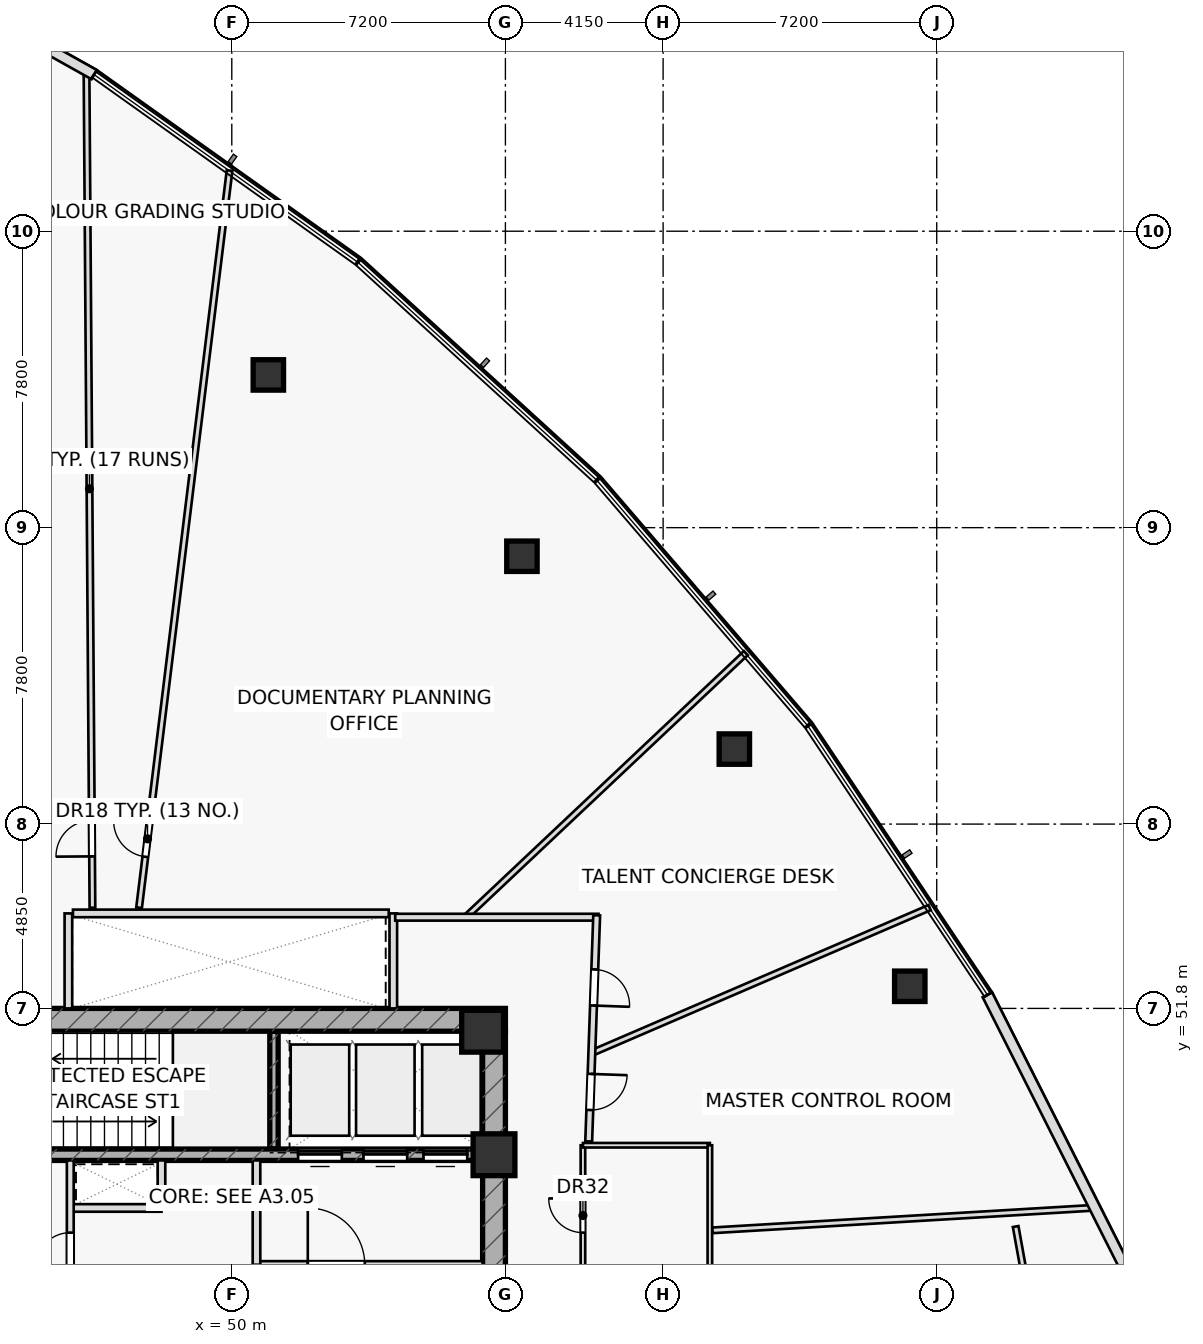
"""IFC4 building model, lengths in metres.
Left out: names, types, materials, properties, quantities, classifications, styles, units other than length and angle.
Written with IfcOpenShell. Run it as: python <this file> out.ifc"""

import sys

from ifc_helpers import new_model, si_unit, direction, frame, frame_2d, origin, origin_2d, place, context, subcontext, project, spatial, rectangle, hollow_rectangle, extrude, element, fill, save


model = new_model("IFC4")
c1 = context("Model", 3, precision=1e-05, world=origin(), true_north=direction((0.0, 1.0)))
c2 = subcontext(c1, "Body", "Model", "MODEL_VIEW")
j1 = project(units=[si_unit("LENGTHUNIT", "METRE"), si_unit("PLANEANGLEUNIT", "RADIAN")], contexts=[c1])
p1 = place(None, origin())
s1 = spatial("IfcSite", under=j1, at=p1, CompositionType="ELEMENT")
p2 = place(p1, origin())
s2 = spatial("IfcBuilding", under=s1, at=p2, CompositionType="ELEMENT")
p3 = place(p2, frame((0.0, 0.0, 54.9)))
s3 = spatial("IfcBuildingStorey", under=s2, at=p3, CompositionType="ELEMENT", Elevation=54.9)
p4 = place(p3, frame((51.11, 48.1, 0.0), z_axis=(0.0, 0.0, 1.0), x_axis=(0.0, 1.0, 0.0)))
e1 = element("IfcWall", 1, at=p4, inside=s3, PredefinedType="SHEAR", context=c2, shape_type="SweptSolid", body=[
    extrude(rectangle(XDim=3.1, YDim=0.22, at=frame_2d((1.55, 0.0))), origin(), (0.0, 0.0, 1.0), 3.6),
])
p5 = place(p3, frame((42.8, 51.5, 0.0), z_axis=(0.0, 0.0, 1.0), x_axis=(1.0, 0.0, 0.0)))
e2 = element("IfcWall", 2, at=p5, inside=s3, PredefinedType="SHEAR", context=c2, shape_type="SweptSolid", body=[
    extrude(rectangle(XDim=14.4, YDim=0.6, at=frame_2d((7.2, 0.0))), origin(), (0.0, 0.0, 1.0), 3.6),
])
p6 = place(p5, frame((0.88, 0.0, 0.0)))
e3 = element("IfcOpeningElement", 3, at=p6, cuts=e2, PredefinedType="OPENING", context=c2, shape_type="SweptSolid", body=[
    extrude(rectangle(XDim=1.05, YDim=2.2, at=frame_2d((0.525, 1.1))), frame((0.0, 0.31, 0.0), z_axis=(0.0, -1.0, 0.0), x_axis=(1.0, 0.0, 0.0)), (0.0, 0.0, 1.0), 0.62),
])
p7 = place(p3, frame((56.9, 38.8, 0.0), z_axis=(0.0, 0.0, 1.0), x_axis=(0.0, 1.0, 0.0)))
e4 = element("IfcWall", 4, at=p7, inside=s3, PredefinedType="SHEAR", context=c2, shape_type="SweptSolid", body=[
    extrude(rectangle(XDim=12.4, YDim=0.6, at=frame_2d((6.2, 0.0))), origin(), (0.0, 0.0, 1.0), 3.6),
])
p8 = place(p7, frame((3.85, 0.0, 0.0)))
e5 = element("IfcOpeningElement", 5, at=p8, cuts=e4, PredefinedType="OPENING", context=c2, shape_type="SweptSolid", body=[
    extrude(rectangle(XDim=1.5, YDim=2.2, at=frame_2d((0.75, 1.1))), frame((0.0, 0.31, 0.0), z_axis=(0.0, -1.0, 0.0), x_axis=(1.0, 0.0, 0.0)), (0.0, 0.0, 1.0), 0.62),
])
p9 = place(p3, frame((43.4, 47.95, 0.0), z_axis=(0.0, 0.0, 1.0), x_axis=(1.0, 0.0, 0.0)))
e6 = element("IfcWall", 6, at=p9, inside=s3, PredefinedType="SHEAR", context=c2, shape_type="SweptSolid", body=[
    extrude(rectangle(XDim=13.2, YDim=0.3, at=frame_2d((6.6, 0.0))), origin(), (0.0, 0.0, 1.0), 3.6),
])
p10 = place(p9, frame((8.345, 0.0, 0.0)))
e7 = element("IfcOpeningElement", 7, at=p10, cuts=e6, PredefinedType="OPENING", context=c2, shape_type="SweptSolid", body=[
    extrude(rectangle(XDim=1.15, YDim=2.2, at=frame_2d((0.575, 1.1))), frame((0.0, 0.16, 0.0), z_axis=(0.0, -1.0, 0.0), x_axis=(1.0, 0.0, 0.0)), (0.0, 0.0, 1.0), 0.32),
])
p11 = place(p9, frame((10.065, 0.0, 0.0)))
e8 = element("IfcOpeningElement", 8, at=p11, cuts=e6, PredefinedType="OPENING", context=c2, shape_type="SweptSolid", body=[
    extrude(rectangle(XDim=1.15, YDim=2.2, at=frame_2d((0.575, 1.1))), frame((0.0, 0.16, 0.0), z_axis=(0.0, -1.0, 0.0), x_axis=(1.0, 0.0, 0.0)), (0.0, 0.0, 1.0), 0.32),
])
p12 = place(p9, frame((11.645, 0.0, 0.0)))
e9 = element("IfcOpeningElement", 9, at=p12, cuts=e6, PredefinedType="OPENING", context=c2, shape_type="SweptSolid", body=[
    extrude(rectangle(XDim=1.15, YDim=2.2, at=frame_2d((0.575, 1.1))), frame((0.0, 0.16, 0.0), z_axis=(0.0, -1.0, 0.0), x_axis=(1.0, 0.0, 0.0)), (0.0, 0.0, 1.0), 0.32),
])
for number, where, z_axis, x_axis in (
    (10, (56.9, 47.95, 0.0), (0.0, 0.0, 1.0), (1.0, 0.0, 0.0)),
    (11, (56.6, 51.2, 0.0), (0.0, 0.0, 1.0), (1.0, 0.0, 0.0)),
):
    element("IfcColumn", number, at=place(p3, frame(where, z_axis=z_axis, x_axis=x_axis)), inside=s3, PredefinedType="COLUMN", context=c2, shape_type="SweptSolid", body=[
        extrude(rectangle(XDim=1.1, YDim=1.1, at=origin_2d()), origin(), (0.0, 0.0, 1.0), 3.6),
    ])
for number, where, z_axis, x_axis in (
    (12, (67.841, 52.383, 0.0), (0.0, 0.0, 1.0), (1.0, 0.0, 0.0)),
    (13, (63.224, 58.624, 0.0), (0.0, 0.0, 1.0), (1.0, 0.0, 0.0)),
    (14, (57.635, 63.698, 0.0), (0.0, 0.0, 1.0), (1.0, 0.0, 0.0)),
    (15, (50.962, 68.469, 0.0), (0.0, 0.0, 1.0), (1.0, 0.0, 0.0)),
):
    element("IfcColumn", number, at=place(p3, frame(where, z_axis=z_axis, x_axis=x_axis)), inside=s3, PredefinedType="COLUMN", context=c2, shape_type="SweptSolid", body=[
        extrude(hollow_rectangle(XDim=0.8, YDim=0.8, WallThickness=0.045, at=origin_2d()), origin(), (0.0, 0.0, 1.0), 3.6),
    ])
for number, where, z_axis, x_axis in (
    (16, (45.7, 51.8, 0.0), (0.0, 0.0, 1.0), (0.0, 1.0, 0.0)),
    (17, (54.25, 51.8, 0.0), (0.0, 0.0, 1.0), (0.0, 1.0, 0.0)),
):
    element("IfcWall", number, at=place(p3, frame(where, z_axis=z_axis, x_axis=x_axis)), inside=s3, PredefinedType="PARTITIONING", context=c2, shape_type="SweptSolid", body=[
        extrude(rectangle(XDim=2.5, YDim=0.2, at=frame_2d((1.25, 0.0))), origin(), (0.0, 0.0, 1.0), 3.6),
    ])
p13 = place(p3, frame((45.75, 46.55, 0.0), z_axis=(0.0, 0.0, 1.0), x_axis=(1.0, 0.0, 0.0)))
e18 = element("IfcWall", 18, at=p13, inside=s3, PredefinedType="PARTITIONING", context=c2, shape_type="SweptSolid", body=[
    extrude(rectangle(XDim=2.4, YDim=0.2, at=frame_2d((1.2, 0.0))), origin(), (0.0, 0.0, 1.0), 3.6),
])
p14 = place(p3, frame((48.15, 46.55, 0.0), z_axis=(0.0, 0.0, 1.0), x_axis=(0.0, 1.0, 0.0)))
e19 = element("IfcWall", 19, at=p14, inside=s3, PredefinedType="PARTITIONING", context=c2, shape_type="SweptSolid", body=[
    extrude(rectangle(XDim=1.25, YDim=0.2, at=frame_2d((0.625, 0.0))), origin(), (0.0, 0.0, 1.0), 3.6),
])
p15 = place(p3, frame((50.65, 45.05, 0.0), z_axis=(0.0, 0.0, 1.0), x_axis=(1.0, 0.0, 0.0)))
e20 = element("IfcWall", 20, at=p15, inside=s3, PredefinedType="PARTITIONING", context=c2, shape_type="SweptSolid", body=[
    extrude(rectangle(XDim=5.95, YDim=0.2, at=frame_2d((2.975, 0.0))), origin(), (0.0, 0.0, 1.0), 3.6),
])
p16 = place(p15, frame((1.35, 0.0, 0.0)))
e21 = element("IfcOpeningElement", 21, at=p16, cuts=e20, PredefinedType="OPENING", context=c2, shape_type="SweptSolid", body=[
    extrude(rectangle(XDim=1.5, YDim=2.2, at=frame_2d((0.75, 1.1))), frame((0.0, 0.11, 0.0), z_axis=(0.0, -1.0, 0.0), x_axis=(1.0, 0.0, 0.0)), (0.0, 0.0, 1.0), 0.22),
])
p17 = place(p3, frame((50.65, 45.05, 0.0), z_axis=(0.0, 0.0, 1.0), x_axis=(0.0, 1.0, 0.0)))
e22 = element("IfcWall", 22, at=p17, inside=s3, PredefinedType="PARTITIONING", context=c2, shape_type="SweptSolid", body=[
    extrude(rectangle(XDim=2.75, YDim=0.2, at=frame_2d((1.375, 0.0))), origin(), (0.0, 0.0, 1.0), 3.6),
])
p18 = place(p3, frame((45.75, 42.2, 0.0), z_axis=(0.0, 0.0, 1.0), x_axis=(0.0, 1.0, 0.0)))
e23 = element("IfcWall", 23, at=p18, inside=s3, PredefinedType="PARTITIONING", context=c2, shape_type="SweptSolid", body=[
    extrude(rectangle(XDim=5.6, YDim=0.18, at=frame_2d((2.8, 0.0))), origin(), (0.0, 0.0, 1.0), 3.6),
])
p19 = place(p18, frame((0.42, 0.0, 0.0)))
e24 = element("IfcOpeningElement", 24, at=p19, cuts=e23, PredefinedType="OPENING", context=c2, shape_type="SweptSolid", body=[
    extrude(rectangle(XDim=0.85, YDim=2.05, at=frame_2d((0.425, 1.025))), frame((0.0, 0.1, 0.0), z_axis=(0.0, -1.0, 0.0), x_axis=(1.0, 0.0, 0.0)), (0.0, 0.0, 1.0), 0.2),
])
p20 = place(p18, frame((1.57, 0.0, 0.0)))
e25 = element("IfcOpeningElement", 25, at=p20, cuts=e23, PredefinedType="OPENING", context=c2, shape_type="SweptSolid", body=[
    extrude(rectangle(XDim=0.85, YDim=2.05, at=frame_2d((0.425, 1.025))), frame((0.0, 0.1, 0.0), z_axis=(0.0, -1.0, 0.0), x_axis=(1.0, 0.0, 0.0)), (0.0, 0.0, 1.0), 0.2),
])
p21 = place(p18, frame((2.8, 0.0, 0.0)))
e26 = element("IfcOpeningElement", 26, at=p21, cuts=e23, PredefinedType="OPENING", context=c2, shape_type="SweptSolid", body=[
    extrude(rectangle(XDim=0.9, YDim=2.05, at=frame_2d((0.45, 1.025))), frame((0.0, 0.1, 0.0), z_axis=(0.0, -1.0, 0.0), x_axis=(1.0, 0.0, 0.0)), (0.0, 0.0, 1.0), 0.2),
])
p22 = place(p3, frame((72.969, 33.091, 0.0), z_axis=(0.0, 0.0, 1.0), x_axis=(-0.177742578179, 0.984077017261, 0.0)))
e27 = element("IfcWall", 27, at=p22, inside=s3, PredefinedType="PARTITIONING", context=c2, shape_type="SweptSolid", body=[
    extrude(rectangle(XDim=13.179, YDim=0.15, at=frame_2d((6.59, 0.0))), origin(), (0.0, 0.0, 1.0), 2.925),
])
p23 = place(p3, frame((59.24, 41.2, 0.0), z_axis=(0.0, 0.0, 1.0), x_axis=(0.0, 1.0, 0.0)))
e28 = element("IfcWall", 28, at=p23, inside=s3, PredefinedType="PARTITIONING", context=c2, shape_type="SweptSolid", body=[
    extrude(rectangle(XDim=7.0, YDim=0.12, at=frame_2d((3.5, 0.0))), origin(), (0.0, 0.0, 1.0), 3.6),
])
p24 = place(p23, frame((1.15, 0.0, 0.0)))
e29 = element("IfcOpeningElement", 29, at=p24, cuts=e28, PredefinedType="OPENING", context=c2, shape_type="SweptSolid", body=[
    extrude(rectangle(XDim=0.9, YDim=2.05, at=frame_2d((0.45, 1.025))), frame((0.0, 0.07, 0.0), z_axis=(0.0, -1.0, 0.0), x_axis=(1.0, 0.0, 0.0)), (0.0, 0.0, 1.0), 0.14),
])
p25 = place(p23, frame((4.7, 0.0, 0.0)))
e30 = element("IfcOpeningElement", 30, at=p25, cuts=e28, PredefinedType="OPENING", context=c2, shape_type="SweptSolid", body=[
    extrude(rectangle(XDim=0.9, YDim=2.05, at=frame_2d((0.45, 1.025))), frame((0.0, 0.07, 0.0), z_axis=(0.0, -1.0, 0.0), x_axis=(1.0, 0.0, 0.0)), (0.0, 0.0, 1.0), 0.14),
])
p26 = place(p3, frame((59.24, 48.2, 0.0), z_axis=(0.0, 0.0, 1.0), x_axis=(1.0, 0.0, 0.0)))
e31 = element("IfcWall", 31, at=p26, inside=s3, PredefinedType="PARTITIONING", context=c2, shape_type="SweptSolid", body=[
    extrude(rectangle(XDim=3.34, YDim=0.12, at=frame_2d((1.67, 0.0))), origin(), (0.0, 0.0, 1.0), 3.6),
])
p27 = place(p3, frame((62.58, 41.2, 0.0), z_axis=(0.0, 0.0, 1.0), x_axis=(0.0, 1.0, 0.0)))
e32 = element("IfcWall", 32, at=p27, inside=s3, PredefinedType="PARTITIONING", context=c2, shape_type="SweptSolid", body=[
    extrude(rectangle(XDim=7.0, YDim=0.12, at=frame_2d((3.5, 0.0))), origin(), (0.0, 0.0, 1.0), 3.6),
])
p28 = place(p3, frame((47.56, 54.45, 0.0), z_axis=(0.0, 0.0, 1.0), x_axis=(0.121866471356, 0.99254650428, 0.0)))
e33 = element("IfcWall", 33, at=p28, inside=s3, PredefinedType="PARTITIONING", context=c2, shape_type="SweptSolid", body=[
    extrude(rectangle(XDim=19.543, YDim=0.15, at=frame_2d((9.771, 0.0))), origin(), (0.0, 0.0, 1.0), 2.975),
])
p29 = place(p28, frame((1.35, 0.0, 0.0)))
e34 = element("IfcOpeningElement", 34, at=p29, cuts=e33, PredefinedType="OPENING", context=c2, shape_type="SweptSolid", body=[
    extrude(rectangle(XDim=0.95, YDim=2.05, at=frame_2d((0.475, 1.025))), frame((0.0, 0.085, 0.0), z_axis=(0.0, -1.0, 0.0), x_axis=(1.0, 0.0, 0.0)), (0.0, 0.0, 1.0), 0.17),
])
p30 = place(p3, frame((46.333, 54.45, 0.0), z_axis=(0.0, 0.0, 1.0), x_axis=(-0.007065709124, 0.999975037566, 0.0)))
e35 = element("IfcWall", 35, at=p30, inside=s3, PredefinedType="PARTITIONING", context=c2, shape_type="SweptSolid", body=[
    extrude(rectangle(XDim=22.045, YDim=0.15, at=frame_2d((11.022, 0.0))), origin(), (0.0, 0.0, 1.0), 2.975),
])
p31 = place(p30, frame((1.35, 0.0, 0.0)))
e36 = element("IfcOpeningElement", 36, at=p31, cuts=e35, PredefinedType="OPENING", context=c2, shape_type="SweptSolid", body=[
    extrude(rectangle(XDim=0.95, YDim=2.05, at=frame_2d((0.475, 1.025))), frame((0.0, 0.085, 0.0), z_axis=(0.0, -1.0, 0.0), x_axis=(1.0, 0.0, 0.0)), (0.0, 0.0, 1.0), 0.17),
])
p32 = place(p3, frame((62.65, 45.961, 0.0), z_axis=(0.0, 0.0, 1.0), x_axis=(0.998256468531, 0.059025613391, 0.0)))
e37 = element("IfcWall", 37, at=p32, inside=s3, PredefinedType="PARTITIONING", context=c2, shape_type="SweptSolid", body=[
    extrude(rectangle(XDim=10.088, YDim=0.15, at=frame_2d((5.044, 0.0))), origin(), (0.0, 0.0, 1.0), 2.975),
])
p33 = place(p3, frame((59.474, 50.627, 0.0), z_axis=(0.0, 0.0, 1.0), x_axis=(0.918535829974, 0.395337740488, 0.0)))
e38 = element("IfcWall", 38, at=p33, inside=s3, PredefinedType="PARTITIONING", context=c2, shape_type="SweptSolid", body=[
    extrude(rectangle(XDim=9.677, YDim=0.15, at=frame_2d((4.838, 0.0))), origin(), (0.0, 0.0, 1.0), 2.925),
])
p34 = place(p3, frame((56.156, 54.2, 0.0), z_axis=(0.0, 0.0, 1.0), x_axis=(0.72755365907, 0.686050780317, 0.0)))
e39 = element("IfcWall", 39, at=p34, inside=s3, PredefinedType="PARTITIONING", context=c2, shape_type="SweptSolid", body=[
    extrude(rectangle(XDim=10.13, YDim=0.15, at=frame_2d((5.065, 0.0))), origin(), (0.0, 0.0, 1.0), 2.925),
])
p35 = place(p3, frame((54.3, 54.2, 0.0), z_axis=(0.0, 0.0, 1.0), x_axis=(1.0, 0.0, 0.0)))
e40 = element("IfcWall", 40, at=p35, inside=s3, PredefinedType="PARTITIONING", context=c2, shape_type="SweptSolid", body=[
    extrude(rectangle(XDim=5.35, YDim=0.18, at=frame_2d((2.675, 0.0))), origin(), (0.0, 0.0, 1.0), 2.925),
])
p36 = place(p3, frame((59.602, 54.25, 0.0), z_axis=(0.0, 0.0, 1.0), x_axis=(-0.035265891834, -0.999377964973, 0.0)))
e41 = element("IfcWall", 41, at=p36, inside=s3, PredefinedType="PARTITIONING", context=c2, shape_type="SweptSolid", body=[
    extrude(rectangle(XDim=5.954, YDim=0.18, at=frame_2d((2.977, 0.0))), origin(), (0.0, 0.0, 1.0), 2.925),
])
p37 = place(p36, frame((1.426, 0.0, 0.0)))
e42 = element("IfcOpeningElement", 42, at=p37, cuts=e41, PredefinedType="OPENING", context=c2, shape_type="SweptSolid", body=[
    extrude(rectangle(XDim=0.95, YDim=2.05, at=frame_2d((0.475, 1.025))), frame((0.0, 0.1, 0.0), z_axis=(0.0, -1.0, 0.0), x_axis=(1.0, 0.0, 0.0)), (0.0, 0.0, 1.0), 0.2),
])
p38 = place(p36, frame((4.176, 0.0, 0.0)))
e43 = element("IfcOpeningElement", 43, at=p38, cuts=e41, PredefinedType="OPENING", context=c2, shape_type="SweptSolid", body=[
    extrude(rectangle(XDim=0.95, YDim=2.05, at=frame_2d((0.475, 1.025))), frame((0.0, 0.1, 0.0), z_axis=(0.0, -1.0, 0.0), x_axis=(1.0, 0.0, 0.0)), (0.0, 0.0, 1.0), 0.2),
])
p39 = place(p3, frame((46.377, 76.371, 0.0), z_axis=(0.0, 0.0, 1.0), x_axis=(-0.872541591188, 0.488539836295, 0.0)))
e44 = element("IfcWall", 44, at=p39, inside=s3, PredefinedType="STANDARD", context=c2, shape_type="SweptSolid", body=[
    extrude(rectangle(XDim=2.223, YDim=0.28, at=frame_2d((1.112, 0.0))), origin(), (0.0, 0.0, 1.0), 3.6),
])
p40 = place(p3, frame((73.728, 44.537, 0.0), z_axis=(0.0, 0.0, 1.0), x_axis=(-0.450471385419, 0.892790866283, 0.0)))
e45 = element("IfcWall", 45, at=p40, inside=s3, PredefinedType="STANDARD", context=c2, shape_type="SweptSolid", body=[
    extrude(rectangle(XDim=8.535, YDim=0.28, at=frame_2d((4.268, 0.0))), origin(), (0.0, 0.0, 1.0), 3.6),
])
p41 = place(p3, frame((45.82, 54.3, 0.0), z_axis=(0.0, 0.0, 1.0), x_axis=(1.0, 0.0, 0.0)))
e46 = element("IfcWall", 46, at=p41, inside=s3, PredefinedType="PARTITIONING", context=c2, shape_type="SweptSolid", body=[
    extrude(rectangle(XDim=8.31, YDim=0.2, at=frame_2d((4.155, 0.0))), origin(), (0.0, 0.0, 1.0), 3.6),
])
p42 = place(p16, origin())
e47 = element("IfcDoor", 47, at=p42, inside=s3, OperationType="SINGLE_SWING_LEFT", PredefinedType="DOOR", context=c2, shape_type="SweptSolid", body=[
    extrude(rectangle(XDim=1.5, YDim=2.2, at=frame_2d((0.75, 1.1))), frame((0.0, 0.025, 0.0), z_axis=(0.0, -1.0, 0.0), x_axis=(1.0, 0.0, 0.0)), (0.0, 0.0, 1.0), 0.05),
])
fill(e21, e47)
p43 = place(p21, origin())
e48 = element("IfcDoor", 48, at=p43, inside=s3, OperationType="SINGLE_SWING_LEFT", PredefinedType="DOOR", context=c2, shape_type="SweptSolid", body=[
    extrude(rectangle(XDim=0.9, YDim=2.05, at=frame_2d((0.45, 1.025))), frame((0.0, 0.025, 0.0), z_axis=(0.0, -1.0, 0.0), x_axis=(1.0, 0.0, 0.0)), (0.0, 0.0, 1.0), 0.05),
])
fill(e26, e48)
p44 = place(p25, origin())
e49 = element("IfcDoor", 49, at=p44, inside=s3, OperationType="SINGLE_SWING_RIGHT", PredefinedType="DOOR", context=c2, shape_type="SweptSolid", body=[
    extrude(rectangle(XDim=0.9, YDim=2.05, at=frame_2d((0.45, 1.025))), frame((0.0, 0.025, 0.0), z_axis=(0.0, -1.0, 0.0), x_axis=(1.0, 0.0, 0.0)), (0.0, 0.0, 1.0), 0.05),
])
fill(e30, e49)
p45 = place(p29, origin())
e50 = element("IfcDoor", 50, at=p45, inside=s3, OperationType="SINGLE_SWING_RIGHT", PredefinedType="DOOR", context=c2, shape_type="SweptSolid", body=[
    extrude(rectangle(XDim=0.95, YDim=2.05, at=frame_2d((0.475, 1.025))), frame((0.0, 0.025, 0.0), z_axis=(0.0, -1.0, 0.0), x_axis=(1.0, 0.0, 0.0)), (0.0, 0.0, 1.0), 0.05),
])
fill(e34, e50)
p46 = place(p31, origin())
e51 = element("IfcDoor", 51, at=p46, inside=s3, OperationType="SINGLE_SWING_LEFT", PredefinedType="DOOR", context=c2, shape_type="SweptSolid", body=[
    extrude(rectangle(XDim=0.95, YDim=2.05, at=frame_2d((0.475, 1.025))), frame((0.0, 0.025, 0.0), z_axis=(0.0, -1.0, 0.0), x_axis=(1.0, 0.0, 0.0)), (0.0, 0.0, 1.0), 0.05),
])
fill(e36, e51)
p47 = place(p37, origin())
e52 = element("IfcDoor", 52, at=p47, inside=s3, OperationType="SINGLE_SWING_RIGHT", PredefinedType="DOOR", context=c2, shape_type="SweptSolid", body=[
    extrude(rectangle(XDim=0.95, YDim=2.05, at=frame_2d((0.475, 1.025))), frame((0.0, 0.025, 0.0), z_axis=(0.0, -1.0, 0.0), x_axis=(1.0, 0.0, 0.0)), (0.0, 0.0, 1.0), 0.05),
])
fill(e42, e52)
p48 = place(p38, origin())
e53 = element("IfcDoor", 53, at=p48, inside=s3, OperationType="SINGLE_SWING_LEFT", PredefinedType="DOOR", context=c2, shape_type="SweptSolid", body=[
    extrude(rectangle(XDim=0.95, YDim=2.05, at=frame_2d((0.475, 1.025))), frame((0.0, 0.025, 0.0), z_axis=(0.0, -1.0, 0.0), x_axis=(1.0, 0.0, 0.0)), (0.0, 0.0, 1.0), 0.05),
])
fill(e43, e53)
p49 = place(p10, origin())
e54 = element("IfcDoor", 54, at=p49, inside=s3, OperationType="SLIDING_TO_LEFT", PredefinedType="DOOR", context=c2, shape_type="SweptSolid", body=[
    extrude(rectangle(XDim=1.15, YDim=2.2, at=frame_2d((0.575, 1.1))), frame((0.0, 0.025, 0.0), z_axis=(0.0, -1.0, 0.0), x_axis=(1.0, 0.0, 0.0)), (0.0, 0.0, 1.0), 0.05),
])
fill(e7, e54)
p50 = place(p11, origin())
e55 = element("IfcDoor", 55, at=p50, inside=s3, OperationType="SLIDING_TO_LEFT", PredefinedType="DOOR", context=c2, shape_type="SweptSolid", body=[
    extrude(rectangle(XDim=1.15, YDim=2.2, at=frame_2d((0.575, 1.1))), frame((0.0, 0.025, 0.0), z_axis=(0.0, -1.0, 0.0), x_axis=(1.0, 0.0, 0.0)), (0.0, 0.0, 1.0), 0.05),
])
fill(e8, e55)
p51 = place(p12, origin())
e56 = element("IfcDoor", 56, at=p51, inside=s3, OperationType="SLIDING_TO_LEFT", PredefinedType="DOOR", context=c2, shape_type="SweptSolid", body=[
    extrude(rectangle(XDim=1.15, YDim=2.2, at=frame_2d((0.575, 1.1))), frame((0.0, 0.025, 0.0), z_axis=(0.0, -1.0, 0.0), x_axis=(1.0, 0.0, 0.0)), (0.0, 0.0, 1.0), 0.05),
])
fill(e9, e56)
save(model, sys.argv[1])
